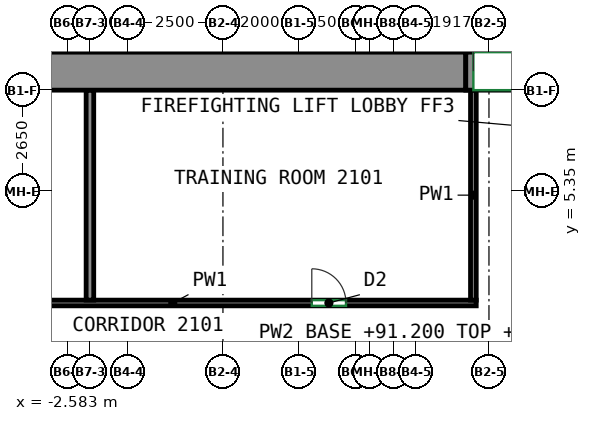
"""IFC4 building model, lengths in metres.
Left out: names, types, materials, properties, quantities, classifications, styles, units other than length and angle.
Written with IfcOpenShell. Run it as: python <this file> out.ifc"""

import sys

from ifc_helpers import new_model, si_unit, direction, frame, frame_2d, origin, place, context, subcontext, project, spatial, rectangle, extrude, source, transform, mapped, element, fill, save


model = new_model("IFC4")
c1 = context("Model", 3, precision=1e-05, world=origin(), true_north=direction((0.0, 1.0)))
c2 = subcontext(c1, "Body", "Model", "MODEL_VIEW")
j1 = project(units=[si_unit("LENGTHUNIT", "METRE"), si_unit("PLANEANGLEUNIT", "RADIAN")], contexts=[c1])
p1 = place(None, origin())
s1 = spatial("IfcSite", under=j1, at=p1, CompositionType="ELEMENT")
p2 = place(p1, origin())
s2 = spatial("IfcBuilding", under=s1, at=p2, CompositionType="ELEMENT")
p3 = place(p2, frame((0.0, 0.0, 91.2)))
s3 = spatial("IfcBuildingStorey", under=s2, at=p3, CompositionType="ELEMENT", Elevation=91.2)
m1 = source(origin(), c2, "Body", "SweptSolid", [
    extrude(rectangle(XDim=14.18, YDim=1.0, at=frame_2d((7.09, 0.0))), origin(), (0.0, 0.0, 1.0), 3.6),
])
p4 = place(p3, frame((-6.29, 8.5, 0.0), z_axis=(0.0, 0.0, 1.0), x_axis=(1.0, 0.0, 0.0)))
e1 = element("IfcWall", 1, at=p4, inside=s3, PredefinedType="SHEAR", context=c2, shape_type="MappedRepresentation", body=[
    mapped(m1, transform((0.0, 0.0, 0.0))),
])
m2 = source(origin(), c2, "Body", "SweptSolid", [
    extrude(rectangle(XDim=2.4, YDim=1.0, at=frame_2d((1.2, 0.0))), origin(), (0.0, 0.0, 1.0), 2.7),
])
p5 = place(p3, frame((7.89, 8.5, 0.0), z_axis=(0.0, 0.0, 1.0), x_axis=(1.0, 0.0, 0.0)))
e2 = element("IfcWall", 2, at=p5, inside=s3, PredefinedType="PARTITIONING", context=c2, shape_type="MappedRepresentation", body=[
    mapped(m2, transform((0.0, 0.0, 0.0))),
])
p6 = place(p5, frame((0.2, 0.0, 0.0)))
e3 = element("IfcOpeningElement", 3, at=p6, cuts=e2, PredefinedType="OPENING", context=c2, shape_type="SweptSolid", body=[
    extrude(rectangle(XDim=2.0, YDim=2.1, at=frame_2d((1.0, 1.05))), frame((0.0, 0.51, 0.0), z_axis=(0.0, -1.0, 0.0), x_axis=(1.0, 0.0, 0.0)), (0.0, 0.0, 1.0), 1.02),
])
p7 = place(p3, frame((-7.805, 2.4, 0.0), z_axis=(0.0, 0.0, 1.0), x_axis=(1.0, 0.0, 0.0)))
e4 = element("IfcWall", 4, at=p7, inside=s3, PredefinedType="PARTITIONING", context=c2, shape_type="SweptSolid", body=[
    extrude(rectangle(XDim=15.97, YDim=0.15, at=frame_2d((7.985, 0.0))), origin(), (0.0, 0.0, 1.0), 3.6),
])
p8 = place(p7, frame((3.812, 0.0, 0.0)))
e5 = element("IfcOpeningElement", 5, at=p8, cuts=e4, PredefinedType="OPENING", context=c2, shape_type="SweptSolid", body=[
    extrude(rectangle(XDim=0.9, YDim=2.1, at=frame_2d((0.45, 1.05))), frame((0.0, 0.085, 0.0), z_axis=(0.0, -1.0, 0.0), x_axis=(1.0, 0.0, 0.0)), (0.0, 0.0, 1.0), 0.17),
])
p9 = place(p7, frame((11.643, 0.0, 0.0)))
e6 = element("IfcOpeningElement", 6, at=p9, cuts=e4, PredefinedType="OPENING", context=c2, shape_type="SweptSolid", body=[
    extrude(rectangle(XDim=0.9, YDim=2.1, at=frame_2d((0.45, 1.05))), frame((0.0, 0.085, 0.0), z_axis=(0.0, -1.0, 0.0), x_axis=(1.0, 0.0, 0.0)), (0.0, 0.0, 1.0), 0.17),
])
p10 = place(p3, frame((8.09, 8.0, 0.0), z_axis=(0.0, 0.0, 1.0), x_axis=(0.0, -1.0, 0.0)))
e7 = element("IfcWall", 7, at=p10, inside=s3, PredefinedType="PARTITIONING", context=c2, shape_type="SweptSolid", body=[
    extrude(rectangle(XDim=5.525, YDim=0.15, at=frame_2d((2.762, 0.0))), origin(), (0.0, 0.0, 1.0), 3.6),
])
p11 = place(p3, frame((-2.0, 2.476, 0.0), z_axis=(0.0, 0.0, 1.0), x_axis=(0.0, 1.0, 0.0)))
e8 = element("IfcWall", 8, at=p11, inside=s3, PredefinedType="PARTITIONING", context=c2, shape_type="SweptSolid", body=[
    extrude(rectangle(XDim=5.524, YDim=0.2, at=frame_2d((2.762, 0.0))), origin(), (0.0, 0.0, 1.0), 3.6),
])
p12 = place(p6, origin())
e9 = element("IfcDoor", 9, at=p12, inside=s3, OperationType="DOUBLE_DOOR_SINGLE_SWING", PredefinedType="DOOR", context=c2, shape_type="SweptSolid", body=[
    extrude(rectangle(XDim=2.0, YDim=2.1, at=frame_2d((1.0, 1.05))), frame((0.0, 0.405, 0.0), z_axis=(0.0, -1.0, 0.0), x_axis=(1.0, 0.0, 0.0)), (0.0, 0.0, 1.0), 0.05),
])
fill(e3, e9)
p13 = place(p9, origin())
e10 = element("IfcDoor", 10, at=p13, inside=s3, OperationType="SINGLE_SWING_LEFT", PredefinedType="DOOR", context=c2, shape_type="SweptSolid", body=[
    extrude(rectangle(XDim=0.9, YDim=2.1, at=frame_2d((0.45, 1.05))), frame((0.0, 0.025, 0.0), z_axis=(0.0, -1.0, 0.0), x_axis=(1.0, 0.0, 0.0)), (0.0, 0.0, 1.0), 0.05),
])
fill(e6, e10)
save(model, sys.argv[1])
